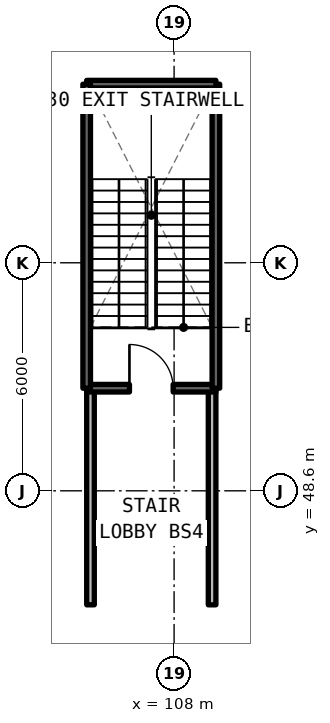
"""IFC4 building model, lengths in metres.
Left out: names, types, materials, properties, quantities, classifications, styles, units other than length and angle.
Written with IfcOpenShell. Run it as: python <this file> out.ifc"""

import sys

from ifc_helpers import new_model, si_unit, direction, frame, frame_2d, origin, place, context, subcontext, project, spatial, rectangle, extrude, element, fill, save


model = new_model("IFC4")
c1 = context("Model", 3, precision=1e-05, world=origin(), true_north=direction((0.0, 1.0)))
c2 = subcontext(c1, "Body", "Model", "MODEL_VIEW")
j1 = project(units=[si_unit("LENGTHUNIT", "METRE"), si_unit("PLANEANGLEUNIT", "RADIAN")], contexts=[c1])
p1 = place(None, origin())
s1 = spatial("IfcSite", under=j1, at=p1, CompositionType="ELEMENT")
p2 = place(p1, origin())
s2 = spatial("IfcBuilding", under=s1, at=p2, CompositionType="ELEMENT")
p3 = place(p2, frame((0.0, 0.0, -4.62)))
s3 = spatial("IfcBuildingStorey", under=s2, at=p3, CompositionType="ELEMENT", Elevation=-4.62)
for number, where, z_axis, x_axis in (
    (1, (105.8, 45.6, 0.0), (0.0, 0.0, 1.0), (0.0, 1.0, 0.0)),
    (2, (109.0, 45.6, 0.0), (0.0, 0.0, 1.0), (0.0, 1.0, 0.0)),
):
    element("IfcWall", number, at=place(p3, frame(where, z_axis=z_axis, x_axis=x_axis)), inside=s3, PredefinedType="SOLIDWALL", context=c2, shape_type="SweptSolid", body=[
        extrude(rectangle(XDim=5.7, YDim=0.2, at=frame_2d((2.85, 0.0))), origin(), (0.0, 0.0, 1.0), 3.56),
    ])
p4 = place(p3, frame((105.7, 51.3, 0.0), z_axis=(0.0, 0.0, 1.0), x_axis=(1.0, 0.0, 0.0)))
e3 = element("IfcWall", 3, at=p4, inside=s3, PredefinedType="SOLIDWALL", context=c2, shape_type="SweptSolid", body=[
    extrude(rectangle(XDim=3.4, YDim=0.2, at=frame_2d((1.7, 0.0))), origin(), (0.0, 0.0, 1.0), 4.62),
])
p5 = place(p4, frame((1.125, 0.0, 0.0)))
e4 = element("IfcOpeningElement", 4, at=p5, cuts=e3, PredefinedType="OPENING", context=c2, shape_type="SweptSolid", body=[
    extrude(rectangle(XDim=1.15, YDim=2.15, at=frame_2d((0.575, 1.075))), frame((0.0, 0.11, 0.0), z_axis=(0.0, -1.0, 0.0), x_axis=(1.0, 0.0, 0.0)), (0.0, 0.0, 1.0), 0.22),
])
p6 = place(p3, frame((109.1, 51.3, 0.0), z_axis=(0.0, 0.0, 1.0), x_axis=(0.0, 1.0, 0.0)))
e5 = element("IfcWall", 5, at=p6, inside=s3, PredefinedType="SOLIDWALL", context=c2, shape_type="SweptSolid", body=[
    extrude(rectangle(XDim=8.0, YDim=0.2, at=frame_2d((4.0, 0.0))), origin(), (0.0, 0.0, 1.0), 4.62),
])
p7 = place(p3, frame((109.1, 59.3, 0.0), z_axis=(0.0, 0.0, 1.0), x_axis=(-1.0, 0.0, 0.0)))
e6 = element("IfcWall", 6, at=p7, inside=s3, PredefinedType="SOLIDWALL", context=c2, shape_type="SweptSolid", body=[
    extrude(rectangle(XDim=3.4, YDim=0.2, at=frame_2d((1.7, 0.0))), origin(), (0.0, 0.0, 1.0), 4.62),
])
p8 = place(p3, frame((105.7, 59.3, 0.0), z_axis=(0.0, 0.0, 1.0), x_axis=(0.0, -1.0, 0.0)))
e7 = element("IfcWall", 7, at=p8, inside=s3, PredefinedType="SOLIDWALL", context=c2, shape_type="SweptSolid", body=[
    extrude(rectangle(XDim=8.0, YDim=0.2, at=frame_2d((4.0, 0.0))), origin(), (0.0, 0.0, 1.0), 4.62),
])
p9 = place(p5, origin())
e8 = element("IfcDoor", 8, at=p9, inside=s3, OperationType="SINGLE_SWING_LEFT", PredefinedType="DOOR", context=c2, shape_type="SweptSolid", body=[
    extrude(rectangle(XDim=1.15, YDim=2.15, at=frame_2d((0.575, 1.075))), frame((0.0, 0.025, 0.0), z_axis=(0.0, -1.0, 0.0), x_axis=(1.0, 0.0, 0.0)), (0.0, 0.0, 1.0), 0.05),
])
fill(e4, e8)
save(model, sys.argv[1])
